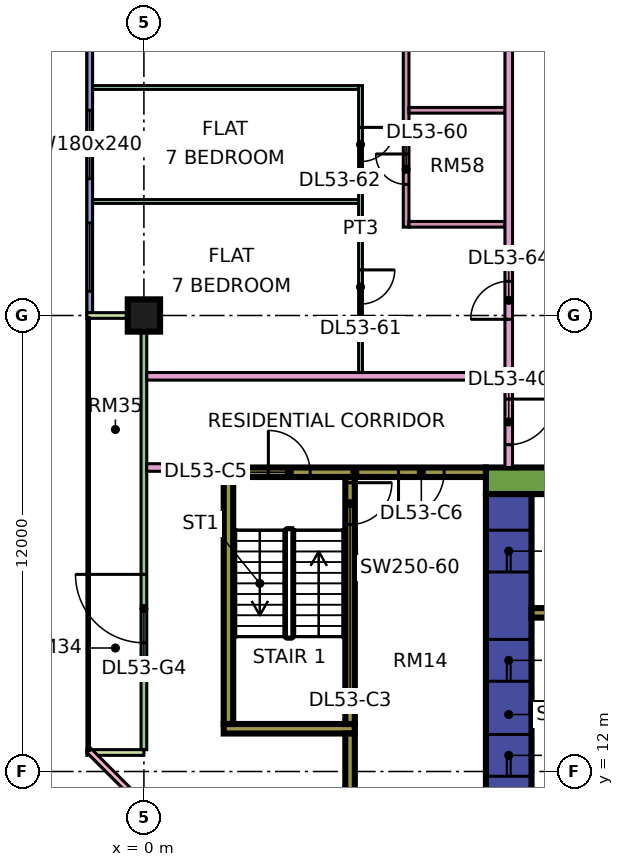
"""IFC4 building model, lengths in metres.
Left out: names, types, materials, properties, quantities, classifications, styles, units other than length and angle.
Written with IfcOpenShell. Run it as: python <this file> out.ifc"""

import sys

from ifc_helpers import new_model, si_unit, direction, frame, frame_2d, origin, origin_2d, place, context, subcontext, project, spatial, rectangle, extrude, element, fill, save


model = new_model("IFC4")
c1 = context("Model", 3, precision=1e-05, world=origin(), true_north=direction((0.0, 1.0)))
c2 = subcontext(c1, "Body", "Model", "MODEL_VIEW")
j1 = project(units=[si_unit("LENGTHUNIT", "METRE"), si_unit("PLANEANGLEUNIT", "RADIAN")], contexts=[c1])
p1 = place(None, origin())
s1 = spatial("IfcSite", under=j1, at=p1, CompositionType="ELEMENT")
p2 = place(p1, origin())
s2 = spatial("IfcBuilding", under=s1, at=p2, CompositionType="ELEMENT")
p3 = place(p2, frame((0.0, 0.0, 226.65)))
s3 = spatial("IfcBuildingStorey", under=s2, at=p3, CompositionType="ELEMENT", Elevation=226.65)
p4 = place(p3, frame((0.0, 24.0, 0.0), z_axis=(0.0, 0.0, 1.0), x_axis=(1.0, 0.0, 0.0)))
e1 = element("IfcColumn", 1, at=p4, inside=s3, PredefinedType="COLUMN", context=c2, shape_type="SweptSolid", body=[
    extrude(rectangle(XDim=0.85, YDim=0.85, at=origin_2d()), origin(), (0.0, 0.0, 1.0), 3.75),
])
p5 = place(p3, frame((9.0, 19.65, 0.0), z_axis=(0.0, 0.0, 1.0), x_axis=(1.0, 0.0, 0.0)))
e2 = element("IfcWall", 2, at=p5, inside=s3, PredefinedType="SHEAR", context=c2, shape_type="SweptSolid", body=[
    extrude(rectangle(XDim=25.0, YDim=0.7, at=frame_2d((12.5, 0.0))), origin(), (0.0, 0.0, 1.0), 3.75),
])
p6 = place(p5, frame((19.1, 0.0, 0.0)))
e3 = element("IfcOpeningElement", 3, at=p6, cuts=e2, PredefinedType="OPENING", context=c2, shape_type="SweptSolid", body=[
    extrude(rectangle(XDim=1.8, YDim=2.4, at=frame_2d((0.9, 1.2))), frame((0.0, 0.36, 0.0), z_axis=(0.0, -1.0, 0.0), x_axis=(1.0, 0.0, 0.0)), (0.0, 0.0, 1.0), 0.72),
])
p7 = place(p3, frame((9.6, 7.7, 0.0), z_axis=(0.0, 0.0, 1.0), x_axis=(0.0, 1.0, 0.0)))
e4 = element("IfcWall", 4, at=p7, inside=s3, PredefinedType="SHEAR", context=c2, shape_type="SweptSolid", body=[
    extrude(rectangle(XDim=11.6, YDim=1.2, at=frame_2d((5.8, 0.0))), origin(), (0.0, 0.0, 1.0), 3.75),
])
p8 = place(p7, frame((4.175, 0.0, 0.0)))
e5 = element("IfcOpeningElement", 5, at=p8, cuts=e4, PredefinedType="OPENING", context=c2, shape_type="SweptSolid", body=[
    extrude(rectangle(XDim=1.1, YDim=2.2, at=frame_2d((0.55, 1.1))), frame((0.0, 0.61, 0.0), z_axis=(0.0, -1.0, 0.0), x_axis=(1.0, 0.0, 0.0)), (0.0, 0.0, 1.0), 1.22),
])
p9 = place(p7, frame((6.675, 0.0, 0.0)))
e6 = element("IfcOpeningElement", 6, at=p9, cuts=e4, PredefinedType="OPENING", context=c2, shape_type="SweptSolid", body=[
    extrude(rectangle(XDim=1.1, YDim=2.2, at=frame_2d((0.55, 1.1))), frame((0.0, 0.61, 0.0), z_axis=(0.0, -1.0, 0.0), x_axis=(1.0, 0.0, 0.0)), (0.0, 0.0, 1.0), 1.22),
])
p10 = place(p7, frame((9.55, 0.0, 0.0)))
e7 = element("IfcOpeningElement", 7, at=p10, cuts=e4, PredefinedType="OPENING", context=c2, shape_type="SweptSolid", body=[
    extrude(rectangle(XDim=1.1, YDim=2.2, at=frame_2d((0.55, 1.1))), frame((0.0, 0.61, 0.0), z_axis=(0.0, -1.0, 0.0), x_axis=(1.0, 0.0, 0.0)), (0.0, 0.0, 1.0), 1.22),
])
p11 = place(p7, frame((1.85, 0.0, 0.0)))
e8 = element("IfcOpeningElement", 8, at=p11, cuts=e4, PredefinedType="OPENING", context=c2, shape_type="SweptSolid", body=[
    extrude(rectangle(XDim=0.9, YDim=2.1, at=frame_2d((0.45, 1.05))), frame((0.0, 0.61, 0.0), z_axis=(0.0, -1.0, 0.0), x_axis=(1.0, 0.0, 0.0)), (0.0, 0.0, 1.0), 1.22),
])
for number, where, z_axis, x_axis in (
    (9, (10.2, 13.675, 0.0), (0.0, 0.0, 1.0), (1.0, 0.0, 0.0)),
    (10, (10.2, 16.175, 0.0), (0.0, 0.0, 1.0), (1.0, 0.0, 0.0)),
):
    element("IfcWall", number, at=place(p3, frame(where, z_axis=z_axis, x_axis=x_axis)), inside=s3, PredefinedType="SHEAR", context=c2, shape_type="SweptSolid", body=[
        extrude(rectangle(XDim=3.0, YDim=0.25, at=frame_2d((1.5, 0.0))), origin(), (0.0, 0.0, 1.0), 3.75),
    ])
p12 = place(p3, frame((2.1, 19.875, 0.0), z_axis=(0.0, 0.0, 1.0), x_axis=(1.0, 0.0, 0.0)))
e11 = element("IfcWall", 11, at=p12, inside=s3, PredefinedType="SHEAR", context=c2, shape_type="SweptSolid", body=[
    extrude(rectangle(XDim=6.9, YDim=0.25, at=frame_2d((3.45, 0.0))), origin(), (0.0, 0.0, 1.0), 3.75),
])
p13 = place(p12, frame((1.175, 0.0, 0.0)))
e12 = element("IfcOpeningElement", 12, at=p13, cuts=e11, PredefinedType="OPENING", context=c2, shape_type="SweptSolid", body=[
    extrude(rectangle(XDim=1.1, YDim=2.2, at=frame_2d((0.55, 1.1))), frame((0.0, 0.135, 0.0), z_axis=(0.0, -1.0, 0.0), x_axis=(1.0, 0.0, 0.0)), (0.0, 0.0, 1.0), 0.27),
])
p14 = place(p12, frame((4.6, 0.0, 0.0)))
e13 = element("IfcOpeningElement", 13, at=p14, cuts=e11, PredefinedType="OPENING", context=c2, shape_type="SweptSolid", body=[
    extrude(rectangle(XDim=1.2, YDim=2.2, at=frame_2d((0.6, 1.1))), frame((0.0, 0.135, 0.0), z_axis=(0.0, -1.0, 0.0), x_axis=(1.0, 0.0, 0.0)), (0.0, 0.0, 1.0), 0.27),
])
p15 = place(p3, frame((2.1, 13.125, 0.0), z_axis=(0.0, 0.0, 1.0), x_axis=(1.0, 0.0, 0.0)))
e14 = element("IfcWall", 14, at=p15, inside=s3, PredefinedType="SHEAR", context=c2, shape_type="SweptSolid", body=[
    extrude(rectangle(XDim=3.45, YDim=0.25, at=frame_2d((1.725, 0.0))), origin(), (0.0, 0.0, 1.0), 3.75),
])
p16 = place(p3, frame((2.225, 13.25, 0.0), z_axis=(0.0, 0.0, 1.0), x_axis=(0.0, 1.0, 0.0)))
e15 = element("IfcWall", 15, at=p16, inside=s3, PredefinedType="SHEAR", context=c2, shape_type="SweptSolid", body=[
    extrude(rectangle(XDim=6.5, YDim=0.25, at=frame_2d((3.25, 0.0))), origin(), (0.0, 0.0, 1.0), 3.75),
])
p17 = place(p3, frame((5.425, 13.25, 0.0), z_axis=(0.0, 0.0, 1.0), x_axis=(0.0, 1.0, 0.0)))
e16 = element("IfcWall", 16, at=p17, inside=s3, PredefinedType="SHEAR", context=c2, shape_type="SweptSolid", body=[
    extrude(rectangle(XDim=6.5, YDim=0.25, at=frame_2d((3.25, 0.0))), origin(), (0.0, 0.0, 1.0), 3.75),
])
p18 = place(p17, frame((5.25, 0.0, 0.0)))
e17 = element("IfcOpeningElement", 17, at=p18, cuts=e16, PredefinedType="OPENING", context=c2, shape_type="SweptSolid", body=[
    extrude(rectangle(XDim=1.1, YDim=2.2, at=frame_2d((0.55, 1.1))), frame((0.0, 0.135, 0.0), z_axis=(0.0, -1.0, 0.0), x_axis=(1.0, 0.0, 0.0)), (0.0, 0.0, 1.0), 0.27),
])
p19 = place(p3, frame((5.425, 9.0, 0.0), z_axis=(0.0, 0.0, 1.0), x_axis=(0.0, 1.0, 0.0)))
e18 = element("IfcWall", 18, at=p19, inside=s3, PredefinedType="SHEAR", context=c2, shape_type="SweptSolid", body=[
    extrude(rectangle(XDim=4.0, YDim=0.25, at=frame_2d((2.0, 0.0))), origin(), (0.0, 0.0, 1.0), 3.75),
])
p20 = place(p3, frame((-1.425, 35.925, 0.0), z_axis=(0.0, 0.0, 1.0), x_axis=(0.0, -1.0, 0.0)))
e19 = element("IfcWall", 19, at=p20, inside=s3, PredefinedType="SOLIDWALL", context=c2, shape_type="SweptSolid", body=[
    extrude(rectangle(XDim=11.85, YDim=0.15, at=frame_2d((5.925, 0.0))), origin(), (0.0, 0.0, 1.0), 3.35),
])
p21 = place(p20, frame((1.462, 0.0, 0.45)))
e20 = element("IfcOpeningElement", 20, at=p21, cuts=e19, PredefinedType="OPENING", context=c2, shape_type="SweptSolid", body=[
    extrude(rectangle(XDim=3.0, YDim=2.4, at=frame_2d((1.5, 1.2))), frame((0.0, 0.085, 0.0), z_axis=(0.0, -1.0, 0.0), x_axis=(1.0, 0.0, 0.0)), (0.0, 0.0, 1.0), 0.17),
])
p22 = place(p20, frame((6.525, 0.0, 0.45)))
e21 = element("IfcOpeningElement", 21, at=p22, cuts=e19, PredefinedType="OPENING", context=c2, shape_type="SweptSolid", body=[
    extrude(rectangle(XDim=1.8, YDim=2.4, at=frame_2d((0.9, 1.2))), frame((0.0, 0.085, 0.0), z_axis=(0.0, -1.0, 0.0), x_axis=(1.0, 0.0, 0.0)), (0.0, 0.0, 1.0), 0.17),
])
p23 = place(p20, frame((9.488, 0.0, 0.45)))
e22 = element("IfcOpeningElement", 22, at=p23, cuts=e19, PredefinedType="OPENING", context=c2, shape_type="SweptSolid", body=[
    extrude(rectangle(XDim=1.8, YDim=2.4, at=frame_2d((0.9, 1.2))), frame((0.0, 0.085, 0.0), z_axis=(0.0, -1.0, 0.0), x_axis=(1.0, 0.0, 0.0)), (0.0, 0.0, 1.0), 0.17),
])
p24 = place(p3, frame((0.0, 23.925, 0.0), z_axis=(0.0, 0.0, 1.0), x_axis=(0.0, -1.0, 0.0)))
e23 = element("IfcWall", 23, at=p24, inside=s3, PredefinedType="SOLIDWALL", context=c2, shape_type="SweptSolid", body=[
    extrude(rectangle(XDim=11.35, YDim=0.15, at=frame_2d((5.675, 0.0))), origin(), (0.0, 0.0, 1.0), 3.35),
])
p25 = place(p24, frame((6.738, 0.0, 0.0)))
e24 = element("IfcOpeningElement", 24, at=p25, cuts=e23, PredefinedType="OPENING", context=c2, shape_type="SweptSolid", body=[
    extrude(rectangle(XDim=1.8, YDim=2.4, at=frame_2d((0.9, 1.2))), frame((0.0, 0.085, 0.0), z_axis=(0.0, -1.0, 0.0), x_axis=(1.0, 0.0, 0.0)), (0.0, 0.0, 1.0), 0.17),
])
for number, where, z_axis, x_axis in (
    (25, (-1.5, 24.0, 0.0), (0.0, 0.0, 1.0), (1.0, 0.0, 0.0)),
    (26, (-1.5, 12.5, 0.0), (0.0, 0.0, 1.0), (1.0, 0.0, 0.0)),
):
    element("IfcWall", number, at=place(p3, frame(where, z_axis=z_axis, x_axis=x_axis)), inside=s3, PredefinedType="SOLIDWALL", context=c2, shape_type="SweptSolid", body=[
        extrude(rectangle(XDim=1.5, YDim=0.15, at=frame_2d((0.75, 0.0))), origin(), (0.0, 0.0, 1.0), 3.35),
    ])
p26 = place(p3, frame((-1.447, 12.553, 0.0), z_axis=(0.0, 0.0, 1.0), x_axis=(0.707106781187, -0.707106781187, 0.0)))
e27 = element("IfcWall", 27, at=p26, inside=s3, PredefinedType="SOLIDWALL", context=c2, shape_type="SweptSolid", body=[
    extrude(rectangle(XDim=19.799, YDim=0.15, at=frame_2d((9.899, 0.0))), origin(), (0.0, 0.0, 1.0), 3.35),
])
p27 = place(p26, frame((2.212, 0.0, 0.45)))
e28 = element("IfcOpeningElement", 28, at=p27, cuts=e27, PredefinedType="OPENING", context=c2, shape_type="SweptSolid", body=[
    extrude(rectangle(XDim=3.0, YDim=2.4, at=frame_2d((1.5, 1.2))), frame((0.0, 0.085, 0.0), z_axis=(0.0, -1.0, 0.0), x_axis=(1.0, 0.0, 0.0)), (0.0, 0.0, 1.0), 0.17),
])
p28 = place(p26, frame((10.216, 0.0, 0.45)))
e29 = element("IfcOpeningElement", 29, at=p28, cuts=e27, PredefinedType="OPENING", context=c2, shape_type="SweptSolid", body=[
    extrude(rectangle(XDim=3.0, YDim=2.4, at=frame_2d((1.5, 1.2))), frame((0.0, 0.085, 0.0), z_axis=(0.0, -1.0, 0.0), x_axis=(1.0, 0.0, 0.0)), (0.0, 0.0, 1.0), 0.17),
])
p29 = place(p3, frame((-1.351, 27.0, 0.0), z_axis=(0.0, 0.0, 1.0), x_axis=(1.0, 0.0, 0.0)))
e30 = element("IfcWall", 30, at=p29, inside=s3, PredefinedType="PARTITIONING", context=c2, shape_type="SweptSolid", body=[
    extrude(rectangle(XDim=7.001, YDim=0.1, at=frame_2d((3.5, 0.0))), origin(), (0.0, 0.0, 1.0), 3.35),
])
p30 = place(p3, frame((-1.35, 30.0, 0.0), z_axis=(0.0, 0.0, 1.0), x_axis=(1.0, 0.0, 0.0)))
e31 = element("IfcWall", 31, at=p30, inside=s3, PredefinedType="PARTITIONING", context=c2, shape_type="SweptSolid", body=[
    extrude(rectangle(XDim=7.0, YDim=0.1, at=frame_2d((3.5, 0.0))), origin(), (0.0, 0.0, 1.0), 3.35),
])
p31 = place(p3, frame((0.074, 20.0, 0.0), z_axis=(0.0, 0.0, 1.0), x_axis=(1.0, 0.0, 0.0)))
e32 = element("IfcWall", 32, at=p31, inside=s3, PredefinedType="PARTITIONING", context=c2, shape_type="SweptSolid", body=[
    extrude(rectangle(XDim=2.026, YDim=0.2, at=frame_2d((1.013, 0.0))), origin(), (0.0, 0.0, 1.0), 3.35),
])
p32 = place(p3, frame((0.074, 22.4, 0.0), z_axis=(0.0, 0.0, 1.0), x_axis=(1.0, 0.0, 0.0)))
e33 = element("IfcWall", 33, at=p32, inside=s3, PredefinedType="PARTITIONING", context=c2, shape_type="SweptSolid", body=[
    extrude(rectangle(XDim=9.426, YDim=0.2, at=frame_2d((4.713, 0.0))), origin(), (0.0, 0.0, 1.0), 3.35),
])
p33 = place(p3, frame((5.7, 22.5, 0.0), z_axis=(0.0, 0.0, 1.0), x_axis=(0.0, 1.0, 0.0)))
e34 = element("IfcWall", 34, at=p33, inside=s3, PredefinedType="PARTITIONING", context=c2, shape_type="SweptSolid", body=[
    extrude(rectangle(XDim=7.55, YDim=0.1, at=frame_2d((3.775, 0.0))), origin(), (0.0, 0.0, 1.0), 3.35),
])
p34 = place(p33, frame((1.8, 0.0, 0.0)))
e35 = element("IfcOpeningElement", 35, at=p34, cuts=e34, PredefinedType="OPENING", context=c2, shape_type="SweptSolid", body=[
    extrude(rectangle(XDim=0.9, YDim=2.1, at=frame_2d((0.45, 1.05))), frame((0.0, 0.06, 0.0), z_axis=(0.0, -1.0, 0.0), x_axis=(1.0, 0.0, 0.0)), (0.0, 0.0, 1.0), 0.12),
])
p35 = place(p33, frame((5.55, 0.0, 0.0)))
e36 = element("IfcOpeningElement", 36, at=p35, cuts=e34, PredefinedType="OPENING", context=c2, shape_type="SweptSolid", body=[
    extrude(rectangle(XDim=0.9, YDim=2.1, at=frame_2d((0.45, 1.05))), frame((0.0, 0.06, 0.0), z_axis=(0.0, -1.0, 0.0), x_axis=(1.0, 0.0, 0.0)), (0.0, 0.0, 1.0), 0.12),
])
p36 = place(p3, frame((6.9, 26.325, 0.0), z_axis=(0.0, 0.0, 1.0), x_axis=(0.0, 1.0, 0.0)))
e37 = element("IfcWall", 37, at=p36, inside=s3, PredefinedType="PARTITIONING", context=c2, shape_type="SweptSolid", body=[
    extrude(rectangle(XDim=9.575, YDim=0.15, at=frame_2d((4.788, 0.0))), origin(), (0.0, 0.0, 1.0), 3.35),
])
p37 = place(p36, frame((1.125, 0.0, 0.0)))
e38 = element("IfcOpeningElement", 38, at=p37, cuts=e37, PredefinedType="OPENING", context=c2, shape_type="SweptSolid", body=[
    extrude(rectangle(XDim=0.8, YDim=2.1, at=frame_2d((0.4, 1.05))), frame((0.0, 0.085, 0.0), z_axis=(0.0, -1.0, 0.0), x_axis=(1.0, 0.0, 0.0)), (0.0, 0.0, 1.0), 0.17),
])
p38 = place(p36, frame((5.925, 0.0, 0.0)))
e39 = element("IfcOpeningElement", 39, at=p38, cuts=e37, PredefinedType="OPENING", context=c2, shape_type="SweptSolid", body=[
    extrude(rectangle(XDim=0.9, YDim=2.1, at=frame_2d((0.45, 1.05))), frame((0.0, 0.085, 0.0), z_axis=(0.0, -1.0, 0.0), x_axis=(1.0, 0.0, 0.0)), (0.0, 0.0, 1.0), 0.17),
])
for number, where, z_axis, x_axis in (
    (40, (6.975, 26.4, 0.0), (0.0, 0.0, 1.0), (1.0, 0.0, 0.0)),
    (41, (6.975, 29.4, 0.0), (0.0, 0.0, 1.0), (1.0, 0.0, 0.0)),
):
    element("IfcWall", number, at=place(p3, frame(where, z_axis=z_axis, x_axis=x_axis)), inside=s3, PredefinedType="PARTITIONING", context=c2, shape_type="SweptSolid", body=[
        extrude(rectangle(XDim=2.525, YDim=0.15, at=frame_2d((1.262, 0.0))), origin(), (0.0, 0.0, 1.0), 3.35),
    ])
p39 = place(p3, frame((9.6, 20.0, 0.0), z_axis=(0.0, 0.0, 1.0), x_axis=(0.0, 1.0, 0.0)))
e42 = element("IfcWall", 42, at=p39, inside=s3, PredefinedType="PARTITIONING", context=c2, shape_type="SweptSolid", body=[
    extrude(rectangle(XDim=44.35, YDim=0.2, at=frame_2d((22.175, 0.0))), origin(), (0.0, 0.0, 1.0), 3.35),
])
p40 = place(p39, frame((17.1, 0.0, 0.0)))
e43 = element("IfcOpeningElement", 43, at=p40, cuts=e42, PredefinedType="OPENING", context=c2, shape_type="SweptSolid", body=[
    extrude(rectangle(XDim=1.0, YDim=2.1, at=frame_2d((0.5, 1.05))), frame((0.0, 0.11, 0.0), z_axis=(0.0, -1.0, 0.0), x_axis=(1.0, 0.0, 0.0)), (0.0, 0.0, 1.0), 0.22),
])
p41 = place(p39, frame((0.6, 0.0, 0.0)))
e44 = element("IfcOpeningElement", 44, at=p41, cuts=e42, PredefinedType="OPENING", context=c2, shape_type="SweptSolid", body=[
    extrude(rectangle(XDim=1.2, YDim=2.1, at=frame_2d((0.6, 1.05))), frame((0.0, 0.11, 0.0), z_axis=(0.0, -1.0, 0.0), x_axis=(1.0, 0.0, 0.0)), (0.0, 0.0, 1.0), 0.22),
])
p42 = place(p39, frame((3.9, 0.0, 0.0)))
e45 = element("IfcOpeningElement", 45, at=p42, cuts=e42, PredefinedType="OPENING", context=c2, shape_type="SweptSolid", body=[
    extrude(rectangle(XDim=1.0, YDim=2.1, at=frame_2d((0.5, 1.05))), frame((0.0, 0.11, 0.0), z_axis=(0.0, -1.0, 0.0), x_axis=(1.0, 0.0, 0.0)), (0.0, 0.0, 1.0), 0.22),
])
p43 = place(p22, origin())
e46 = element("IfcWindow", 46, at=p43, inside=s3, PartitioningType="SINGLE_PANEL", PredefinedType="WINDOW", context=c2, shape_type="SweptSolid", body=[
    extrude(rectangle(XDim=1.8, YDim=2.4, at=frame_2d((0.9, 1.2))), frame((0.0, 0.03, 0.0), z_axis=(0.0, -1.0, 0.0), x_axis=(1.0, 0.0, 0.0)), (0.0, 0.0, 1.0), 0.06),
])
fill(e21, e46)
p44 = place(p23, origin())
e47 = element("IfcWindow", 47, at=p44, inside=s3, PartitioningType="SINGLE_PANEL", PredefinedType="WINDOW", context=c2, shape_type="SweptSolid", body=[
    extrude(rectangle(XDim=1.8, YDim=2.4, at=frame_2d((0.9, 1.2))), frame((0.0, 0.03, 0.0), z_axis=(0.0, -1.0, 0.0), x_axis=(1.0, 0.0, 0.0)), (0.0, 0.0, 1.0), 0.06),
])
fill(e22, e47)
p45 = place(p25, frame((1.8, 0.0, 0.0), z_axis=(0.0, 0.0, 1.0), x_axis=(-1.0, 0.0, 0.0)))
e48 = element("IfcDoor", 48, at=p45, inside=s3, OperationType="DOUBLE_DOOR_SINGLE_SWING", PredefinedType="DOOR", context=c2, shape_type="SweptSolid", body=[
    extrude(rectangle(XDim=1.8, YDim=2.4, at=frame_2d((0.9, 1.2))), frame((0.0, 0.025, 0.0), z_axis=(0.0, -1.0, 0.0), x_axis=(1.0, 0.0, 0.0)), (0.0, 0.0, 1.0), 0.05),
])
fill(e24, e48)
p46 = place(p8, origin())
e49 = element("IfcDoor", 49, at=p46, inside=s3, OperationType="DOUBLE_DOOR_SLIDING", PredefinedType="DOOR", context=c2, shape_type="SweptSolid", body=[
    extrude(rectangle(XDim=1.1, YDim=2.2, at=frame_2d((0.55, 1.1))), frame((0.0, 0.025, 0.0), z_axis=(0.0, -1.0, 0.0), x_axis=(1.0, 0.0, 0.0)), (0.0, 0.0, 1.0), 0.05),
])
fill(e5, e49)
p47 = place(p9, origin())
e50 = element("IfcDoor", 50, at=p47, inside=s3, OperationType="DOUBLE_DOOR_SLIDING", PredefinedType="DOOR", context=c2, shape_type="SweptSolid", body=[
    extrude(rectangle(XDim=1.1, YDim=2.2, at=frame_2d((0.55, 1.1))), frame((0.0, 0.025, 0.0), z_axis=(0.0, -1.0, 0.0), x_axis=(1.0, 0.0, 0.0)), (0.0, 0.0, 1.0), 0.05),
])
fill(e6, e50)
p48 = place(p10, origin())
e51 = element("IfcDoor", 51, at=p48, inside=s3, OperationType="DOUBLE_DOOR_SLIDING", PredefinedType="DOOR", context=c2, shape_type="SweptSolid", body=[
    extrude(rectangle(XDim=1.1, YDim=2.2, at=frame_2d((0.55, 1.1))), frame((0.0, 0.025, 0.0), z_axis=(0.0, -1.0, 0.0), x_axis=(1.0, 0.0, 0.0)), (0.0, 0.0, 1.0), 0.05),
])
fill(e7, e51)
p49 = place(p18, origin())
e52 = element("IfcDoor", 52, at=p49, inside=s3, OperationType="SINGLE_SWING_RIGHT", PredefinedType="DOOR", context=c2, shape_type="SweptSolid", body=[
    extrude(rectangle(XDim=1.1, YDim=2.2, at=frame_2d((0.55, 1.1))), frame((0.0, 0.025, 0.0), z_axis=(0.0, -1.0, 0.0), x_axis=(1.0, 0.0, 0.0)), (0.0, 0.0, 1.0), 0.05),
])
fill(e17, e52)
p50 = place(p13, origin())
e53 = element("IfcDoor", 53, at=p50, inside=s3, OperationType="SINGLE_SWING_LEFT", PredefinedType="DOOR", context=c2, shape_type="SweptSolid", body=[
    extrude(rectangle(XDim=1.1, YDim=2.2, at=frame_2d((0.55, 1.1))), frame((0.0, 0.025, 0.0), z_axis=(0.0, -1.0, 0.0), x_axis=(1.0, 0.0, 0.0)), (0.0, 0.0, 1.0), 0.05),
])
fill(e12, e53)
p51 = place(p14, frame((1.2, 0.0, 0.0), z_axis=(0.0, 0.0, 1.0), x_axis=(-1.0, 0.0, 0.0)))
e54 = element("IfcDoor", 54, at=p51, inside=s3, OperationType="SINGLE_SWING_LEFT", PredefinedType="DOOR", context=c2, shape_type="SweptSolid", body=[
    extrude(rectangle(XDim=1.2, YDim=2.2, at=frame_2d((0.6, 1.1))), frame((0.0, 0.025, 0.0), z_axis=(0.0, -1.0, 0.0), x_axis=(1.0, 0.0, 0.0)), (0.0, 0.0, 1.0), 0.05),
])
fill(e13, e54)
p52 = place(p41, origin())
e55 = element("IfcDoor", 55, at=p52, inside=s3, OperationType="SINGLE_SWING_RIGHT", PredefinedType="DOOR", context=c2, shape_type="SweptSolid", body=[
    extrude(rectangle(XDim=1.2, YDim=2.1, at=frame_2d((0.6, 1.05))), frame((0.0, 0.025, 0.0), z_axis=(0.0, -1.0, 0.0), x_axis=(1.0, 0.0, 0.0)), (0.0, 0.0, 1.0), 0.05),
])
fill(e44, e55)
p53 = place(p37, frame((0.8, 0.0, 0.0), z_axis=(0.0, 0.0, 1.0), x_axis=(-1.0, 0.0, 0.0)))
e56 = element("IfcDoor", 56, at=p53, inside=s3, OperationType="SINGLE_SWING_RIGHT", PredefinedType="DOOR", context=c2, shape_type="SweptSolid", body=[
    extrude(rectangle(XDim=0.8, YDim=2.1, at=frame_2d((0.4, 1.05))), frame((0.0, 0.025, 0.0), z_axis=(0.0, -1.0, 0.0), x_axis=(1.0, 0.0, 0.0)), (0.0, 0.0, 1.0), 0.05),
])
fill(e38, e56)
p54 = place(p34, origin())
e57 = element("IfcDoor", 57, at=p54, inside=s3, OperationType="SINGLE_SWING_RIGHT", PredefinedType="DOOR", context=c2, shape_type="SweptSolid", body=[
    extrude(rectangle(XDim=0.9, YDim=2.1, at=frame_2d((0.45, 1.05))), frame((0.0, 0.025, 0.0), z_axis=(0.0, -1.0, 0.0), x_axis=(1.0, 0.0, 0.0)), (0.0, 0.0, 1.0), 0.05),
])
fill(e35, e57)
p55 = place(p35, origin())
e58 = element("IfcDoor", 58, at=p55, inside=s3, OperationType="SINGLE_SWING_RIGHT", PredefinedType="DOOR", context=c2, shape_type="SweptSolid", body=[
    extrude(rectangle(XDim=0.9, YDim=2.1, at=frame_2d((0.45, 1.05))), frame((0.0, 0.025, 0.0), z_axis=(0.0, -1.0, 0.0), x_axis=(1.0, 0.0, 0.0)), (0.0, 0.0, 1.0), 0.05),
])
fill(e36, e58)
p56 = place(p42, origin())
e59 = element("IfcDoor", 59, at=p56, inside=s3, OperationType="SINGLE_SWING_LEFT", PredefinedType="DOOR", context=c2, shape_type="SweptSolid", body=[
    extrude(rectangle(XDim=1.0, YDim=2.1, at=frame_2d((0.5, 1.05))), frame((0.0, 0.025, 0.0), z_axis=(0.0, -1.0, 0.0), x_axis=(1.0, 0.0, 0.0)), (0.0, 0.0, 1.0), 0.05),
])
fill(e45, e59)
save(model, sys.argv[1])
